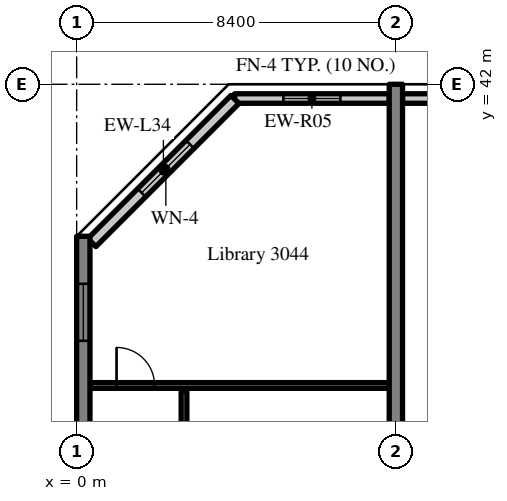
"""IFC4 building model, lengths in metres.
Left out: names, types, materials, properties, quantities, classifications, styles, units other than length and angle.
Written with IfcOpenShell. Run it as: python <this file> out.ifc"""

import sys

from ifc_helpers import new_model, si_unit, direction, frame, frame_2d, origin, place, context, subcontext, project, spatial, rectangle, extrude, source, transform, mapped, element, fill, save


model = new_model("IFC4")
c1 = context("Model", 3, precision=1e-05, world=origin(), true_north=direction((0.0, 1.0)))
c2 = subcontext(c1, "Body", "Model", "MODEL_VIEW")
j1 = project(units=[si_unit("LENGTHUNIT", "METRE"), si_unit("PLANEANGLEUNIT", "RADIAN")], contexts=[c1])
p1 = place(None, origin())
s1 = spatial("IfcSite", under=j1, at=p1, CompositionType="ELEMENT")
p2 = place(p1, origin())
s2 = spatial("IfcBuilding", under=s1, at=p2, CompositionType="ELEMENT")
p3 = place(p2, frame((0.0, 0.0, 125.6)))
s3 = spatial("IfcBuildingStorey", under=s2, at=p3, CompositionType="ELEMENT", Elevation=125.6)
m1 = source(origin(), c2, "Body", "SweptSolid", [
    extrude(rectangle(XDim=16.0, YDim=0.35, at=frame_2d((8.0, 0.0))), origin(), (0.0, 0.0, 1.0), 3.52),
])
p4 = place(p3, frame((0.175, 22.0, 0.0), z_axis=(0.0, 0.0, 1.0), x_axis=(0.0, 1.0, 0.0)))
e1 = element("IfcWall", 1, at=p4, inside=s3, PredefinedType="SHEAR", context=c2, shape_type="MappedRepresentation", body=[
    mapped(m1, transform((0.0, 0.0, 0.0), scale=1.0)),
])
m2 = source(origin(), c2, "Body", "SweptSolid", [
    extrude(rectangle(XDim=1.5, YDim=1.5, at=frame_2d((0.75, 0.75))), frame((0.0, 0.185, 0.0), z_axis=(0.0, -1.0, 0.0), x_axis=(1.0, 0.0, 0.0)), (0.0, 0.0, 1.0), 0.37),
])
p5 = place(p4, frame((1.25, 0.0, 0.9)))
e2 = element("IfcOpeningElement", 2, at=p5, cuts=e1, PredefinedType="OPENING", context=c2, shape_type="MappedRepresentation", body=[
    mapped(m2, transform((0.0, 0.0, 0.0), scale=1.0)),
])
p6 = place(p4, frame((5.25, 0.0, 0.9)))
e3 = element("IfcOpeningElement", 3, at=p6, cuts=e1, PredefinedType="OPENING", context=c2, shape_type="MappedRepresentation", body=[
    mapped(m2, transform((0.0, 0.0, 0.0), scale=1.0)),
])
p7 = place(p4, frame((9.25, 0.0, 0.9)))
e4 = element("IfcOpeningElement", 4, at=p7, cuts=e1, PredefinedType="OPENING", context=c2, shape_type="MappedRepresentation", body=[
    mapped(m2, transform((0.0, 0.0, 0.0), scale=1.0)),
])
p8 = place(p4, frame((13.25, 0.0, 0.9)))
e5 = element("IfcOpeningElement", 5, at=p8, cuts=e1, PredefinedType="OPENING", context=c2, shape_type="MappedRepresentation", body=[
    mapped(m2, transform((0.0, 0.0, 0.0), scale=1.0)),
])
m3 = source(origin(), c2, "Body", "SweptSolid", [
    extrude(rectangle(XDim=20.0, YDim=0.35, at=frame_2d((10.0, 0.0))), origin(), (0.0, 0.0, 1.0), 3.52),
])
p9 = place(p3, frame((8.4, 22.0, 0.0), z_axis=(0.0, 0.0, 1.0), x_axis=(0.0, 1.0, 0.0)))
e6 = element("IfcWall", 6, at=p9, inside=s3, PredefinedType="SHEAR", context=c2, shape_type="MappedRepresentation", body=[
    mapped(m3, transform((0.0, 0.0, 0.0), scale=1.0)),
])
m4 = source(origin(), c2, "Body", "SweptSolid", [
    extrude(rectangle(XDim=4.07, YDim=0.25, at=frame_2d((2.035, 0.0))), origin(), (0.0, 0.0, 1.0), 2.82),
])
p10 = place(p3, frame((8.225, 41.625, 0.0), z_axis=(0.0, 0.0, 1.0), x_axis=(-1.0, 0.0, 0.0)))
e7 = element("IfcWall", 7, at=p10, inside=s3, PredefinedType="SOLIDWALL", context=c2, shape_type="MappedRepresentation", body=[
    mapped(m4, transform((0.0, 0.0, 0.0), scale=1.0)),
])
m5 = source(origin(), c2, "Body", "SweptSolid", [
    extrude(rectangle(XDim=1.5, YDim=1.5, at=frame_2d((0.75, 0.75))), frame((0.0, 0.135, 0.0), z_axis=(0.0, -1.0, 0.0), x_axis=(1.0, 0.0, 0.0)), (0.0, 0.0, 1.0), 0.27),
])
p11 = place(p10, frame((1.285, 0.0, 0.9)))
e8 = element("IfcOpeningElement", 8, at=p11, cuts=e7, PredefinedType="OPENING", context=c2, shape_type="MappedRepresentation", body=[
    mapped(m5, transform((0.0, 0.0, 0.0), scale=1.0)),
])
m6 = source(origin(), c2, "Body", "SweptSolid", [
    extrude(rectangle(XDim=3.675, YDim=0.25, at=frame_2d((1.837, 0.0))), origin(), (0.0, 0.0, 1.0), 2.82),
])
p12 = place(p3, frame((12.25, 41.625, 0.0), z_axis=(0.0, 0.0, 1.0), x_axis=(-1.0, 0.0, 0.0)))
e9 = element("IfcWall", 9, at=p12, inside=s3, PredefinedType="SOLIDWALL", context=c2, shape_type="MappedRepresentation", body=[
    mapped(m6, transform((0.0, 0.0, 0.0), scale=1.0)),
])
p13 = place(p12, frame((1.087, 0.0, 0.9)))
e10 = element("IfcOpeningElement", 10, at=p13, cuts=e9, PredefinedType="OPENING", context=c2, shape_type="MappedRepresentation", body=[
    mapped(m5, transform((0.0, 0.0, 0.0), scale=1.0)),
])
m7 = source(origin(), c2, "Body", "SweptSolid", [
    extrude(rectangle(XDim=5.326, YDim=0.3, at=frame_2d((2.663, 0.0))), origin(), (0.0, 0.0, 1.0), 3.52),
])
p14 = place(p3, frame((4.166, 41.6, 0.0), z_axis=(0.0, 0.0, 1.0), x_axis=(-0.707106781187, -0.707106781187, 0.0)))
e11 = element("IfcWall", 11, at=p14, inside=s3, PredefinedType="SOLIDWALL", context=c2, shape_type="MappedRepresentation", body=[
    mapped(m7, transform((0.0, 0.0, 0.0), scale=1.0)),
])
m8 = source(origin(), c2, "Body", "SweptSolid", [
    extrude(rectangle(XDim=1.8, YDim=1.5, at=frame_2d((0.9, 0.75))), frame((0.0, 0.16, 0.0), z_axis=(0.0, -1.0, 0.0), x_axis=(1.0, 0.0, 0.0)), (0.0, 0.0, 1.0), 0.32),
])
p15 = place(p14, frame((1.672, 0.0, 0.9)))
e12 = element("IfcOpeningElement", 12, at=p15, cuts=e11, PredefinedType="OPENING", context=c2, shape_type="MappedRepresentation", body=[
    mapped(m8, transform((0.0, 0.0, 0.0), scale=1.0)),
])
m9 = source(origin(), c2, "Body", "SweptSolid", [
    extrude(rectangle(XDim=3.85, YDim=0.15, at=frame_2d((1.925, 0.0))), origin(), (0.0, 0.0, 1.0), 3.52),
])
p16 = place(p3, frame((2.825, 30.075, 0.0), z_axis=(0.0, 0.0, 1.0), x_axis=(0.0, 1.0, 0.0)))
e13 = element("IfcWall", 13, at=p16, inside=s3, PredefinedType="PARTITIONING", context=c2, shape_type="MappedRepresentation", body=[
    mapped(m9, transform((0.0, 0.0, 0.0), scale=1.0)),
])
m10 = source(origin(), c2, "Body", "SweptSolid", [
    extrude(rectangle(XDim=1.0, YDim=2.1, at=frame_2d((0.5, 1.05))), frame((0.0, 0.085, 0.0), z_axis=(0.0, -1.0, 0.0), x_axis=(1.0, 0.0, 0.0)), (0.0, 0.0, 1.0), 0.17),
])
p17 = place(p16, frame((1.425, 0.0, 0.0)))
e14 = element("IfcOpeningElement", 14, at=p17, cuts=e13, PredefinedType="OPENING", context=c2, shape_type="MappedRepresentation", body=[
    mapped(m10, transform((0.0, 0.0, 0.0), scale=1.0)),
])
m11 = source(origin(), c2, "Body", "SweptSolid", [
    extrude(rectangle(XDim=7.875, YDim=0.15, at=frame_2d((3.938, 0.0))), origin(), (0.0, 0.0, 1.0), 3.52),
])
p18 = place(p3, frame((0.35, 34.075, 0.0), z_axis=(0.0, 0.0, 1.0), x_axis=(1.0, 0.0, 0.0)))
e15 = element("IfcWall", 15, at=p18, inside=s3, PredefinedType="PARTITIONING", context=c2, shape_type="MappedRepresentation", body=[
    mapped(m11, transform((0.0, 0.0, 0.0), scale=1.0)),
])
p19 = place(p18, frame((0.7, 0.0, 0.0)))
e16 = element("IfcOpeningElement", 16, at=p19, cuts=e15, PredefinedType="OPENING", context=c2, shape_type="MappedRepresentation", body=[
    mapped(m10, transform((0.0, 0.0, 0.0), scale=1.0)),
])
m12 = source(origin(), c2, "Body", "SweptSolid", [
    extrude(rectangle(XDim=1.5, YDim=1.5, at=frame_2d((0.75, 0.75))), frame((0.0, 0.03, 0.0), z_axis=(0.0, -1.0, 0.0), x_axis=(1.0, 0.0, 0.0)), (0.0, 0.0, 1.0), 0.06),
])
p20 = place(p11, origin())
e17 = element("IfcWindow", 17, at=p20, inside=s3, PartitioningType="SINGLE_PANEL", PredefinedType="WINDOW", context=c2, shape_type="MappedRepresentation", body=[
    mapped(m12, transform((0.0, 0.0, 0.0), scale=1.0)),
])
fill(e8, e17)
m13 = source(origin(), c2, "Body", "SweptSolid", [
    extrude(rectangle(XDim=1.8, YDim=1.5, at=frame_2d((0.9, 0.75))), frame((0.0, 0.03, 0.0), z_axis=(0.0, -1.0, 0.0), x_axis=(1.0, 0.0, 0.0)), (0.0, 0.0, 1.0), 0.06),
])
p21 = place(p15, origin())
e18 = element("IfcWindow", 18, at=p21, inside=s3, PartitioningType="SINGLE_PANEL", PredefinedType="WINDOW", context=c2, shape_type="MappedRepresentation", body=[
    mapped(m13, transform((0.0, 0.0, 0.0), scale=1.0)),
])
fill(e12, e18)
p22 = place(p8, origin())
e19 = element("IfcWindow", 19, at=p22, inside=s3, PartitioningType="SINGLE_PANEL", PredefinedType="WINDOW", context=c2, shape_type="MappedRepresentation", body=[
    mapped(m12, transform((0.0, 0.0, 0.0), scale=1.0)),
])
fill(e5, e19)
m14 = source(origin(), c2, "Body", "SweptSolid", [
    extrude(rectangle(XDim=1.0, YDim=2.1, at=frame_2d((0.5, 1.05))), frame((0.0, 0.025, 0.0), z_axis=(0.0, -1.0, 0.0), x_axis=(1.0, 0.0, 0.0)), (0.0, 0.0, 1.0), 0.05),
])
p23 = place(p19, origin())
e20 = element("IfcDoor", 20, at=p23, inside=s3, OperationType="SINGLE_SWING_LEFT", PredefinedType="DOOR", context=c2, shape_type="MappedRepresentation", body=[
    mapped(m14, transform((0.0, 0.0, 0.0), scale=1.0)),
])
fill(e16, e20)
save(model, sys.argv[1])
